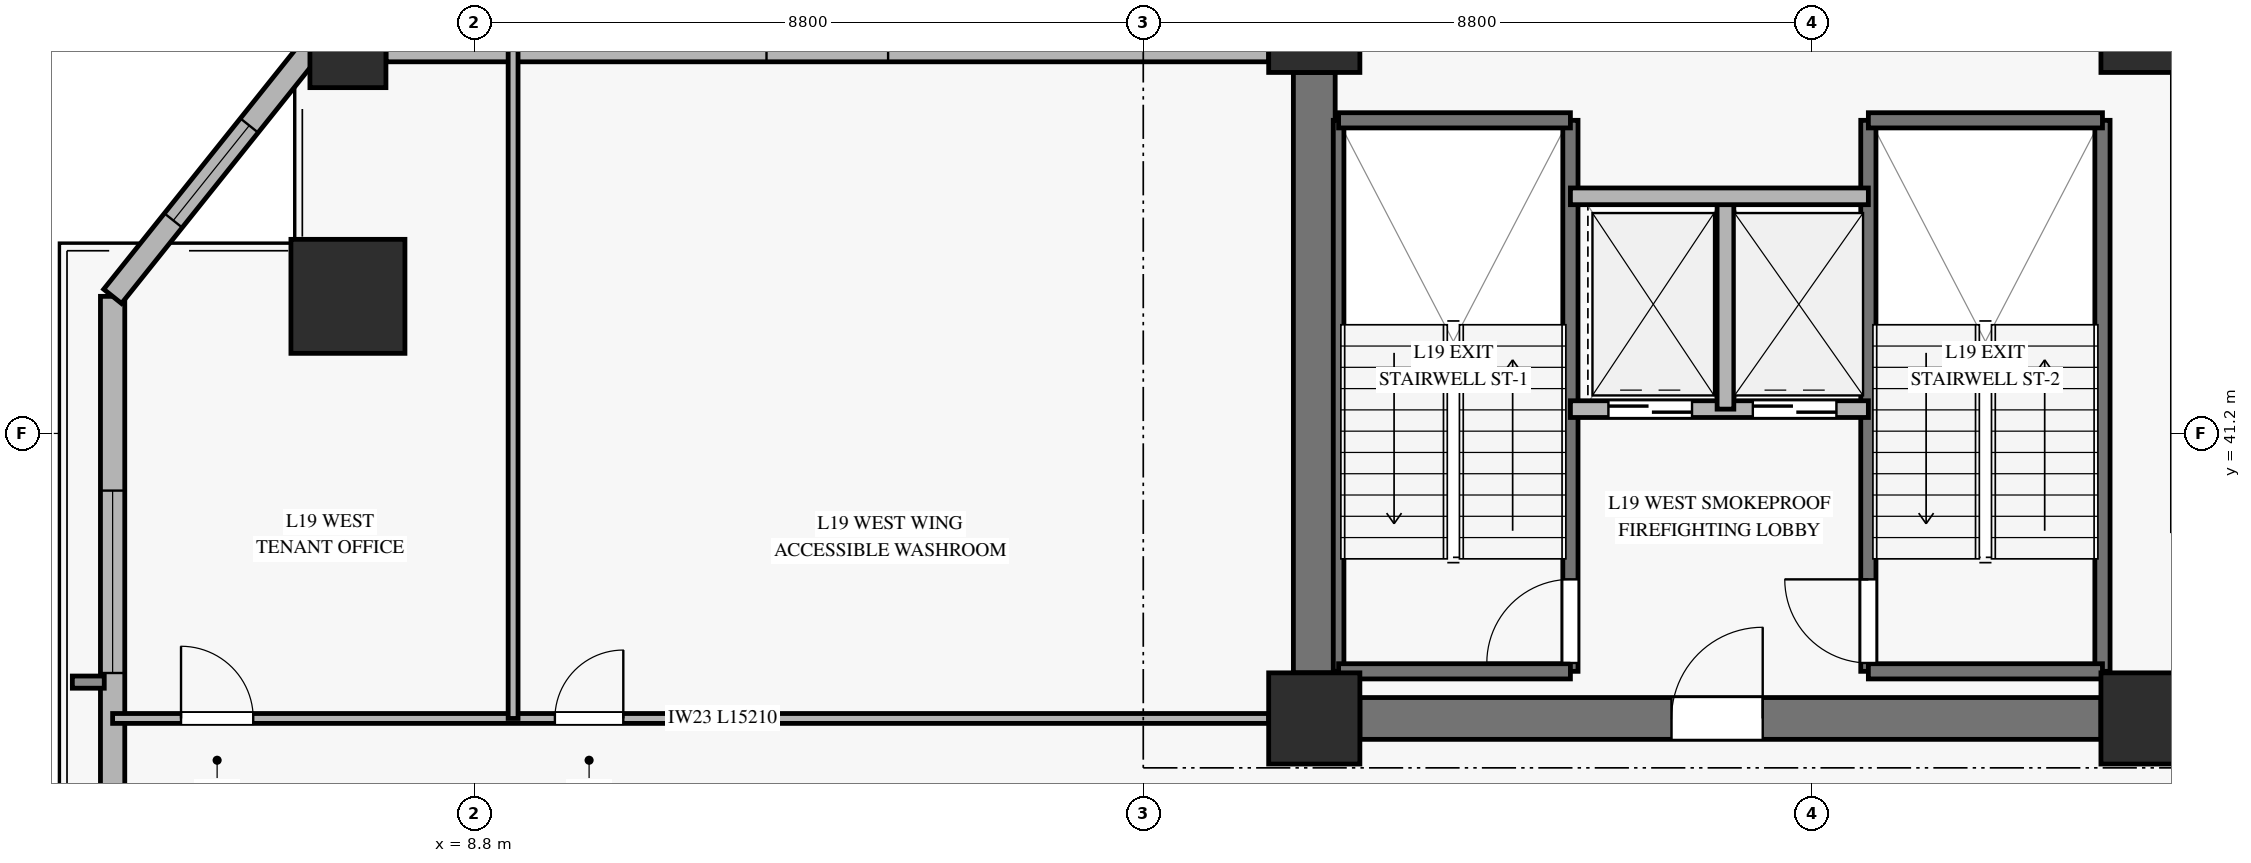
"""IFC4 building model, lengths in metres.
Left out: names, types, materials, properties, quantities, classifications, styles, units other than length and angle.
Written with IfcOpenShell. Run it as: python <this file> out.ifc"""

import sys

from ifc_helpers import new_model, si_unit, direction, frame, frame_2d, origin, origin_2d, place, context, subcontext, project, spatial, rectangle, hollow_rectangle, extrude, source, transform, mapped, element, fill, save


model = new_model("IFC4")
c1 = context("Model", 3, precision=1e-05, world=origin(), true_north=direction((0.0, 1.0)))
c2 = subcontext(c1, "Body", "Model", "MODEL_VIEW")
j1 = project(units=[si_unit("LENGTHUNIT", "METRE"), si_unit("PLANEANGLEUNIT", "RADIAN")], contexts=[c1])
p1 = place(None, origin())
s1 = spatial("IfcSite", under=j1, at=p1, CompositionType="ELEMENT")
p2 = place(p1, origin())
s2 = spatial("IfcBuilding", under=s1, at=p2, CompositionType="ELEMENT")
p3 = place(p2, frame((0.0, 0.0, 79.6)))
s3 = spatial("IfcBuildingStorey", under=s2, at=p3, CompositionType="ELEMENT", Elevation=79.6)
m1 = source(origin(), c2, "Body", "SweptSolid", [
    extrude(rectangle(XDim=1.2, YDim=1.2, at=origin_2d()), origin(), (0.0, 0.0, 1.0), 3.68),
])
for number, where, z_axis, x_axis in (
    (1, (19.85, 37.45, 0.0), (0.0, 0.0, 1.0), (1.0, 0.0, 0.0)),
    (2, (19.85, 46.55, 0.0), (0.0, 0.0, 1.0), (1.0, 0.0, 0.0)),
    (3, (30.8, 37.45, 0.0), (0.0, 0.0, 1.0), (1.0, 0.0, 0.0)),
    (4, (30.8, 46.55, 0.0), (0.0, 0.0, 1.0), (1.0, 0.0, 0.0)),
):
    element("IfcColumn", number, at=place(p3, frame(where, z_axis=z_axis, x_axis=x_axis)), inside=s3, PredefinedType="PILASTER", context=c2, shape_type="MappedRepresentation", body=[
        mapped(m1, transform((0.0, 0.0, 0.0), x_axis=(1.0, 0.0, 0.0), y_axis=(0.0, 1.0, 0.0), z_axis=(0.0, 0.0, 1.0), scale=1.0)),
    ])
p4 = place(p3, frame((20.45, 37.45, 0.0), z_axis=(0.0, 0.0, 1.0), x_axis=(1.0, 0.0, 0.0)))
e5 = element("IfcWall", 5, at=p4, inside=s3, PredefinedType="SHEAR", context=c2, shape_type="SweptSolid", body=[
    extrude(rectangle(XDim=9.75, YDim=0.55, at=frame_2d((4.875, 0.0))), origin(), (0.0, 0.0, 1.0), 3.68),
])
p5 = place(p4, frame((4.1, 0.0, 0.0)))
e6 = element("IfcOpeningElement", 6, at=p5, cuts=e5, PredefinedType="OPENING", context=c2, shape_type="SweptSolid", body=[
    extrude(rectangle(XDim=1.2, YDim=2.15, at=frame_2d((0.6, 1.075))), frame((0.0, 0.285, 0.0), z_axis=(0.0, -1.0, 0.0), x_axis=(1.0, 0.0, 0.0)), (0.0, 0.0, 1.0), 0.57),
])
p6 = place(p3, frame((19.85, 38.05, 0.0), z_axis=(0.0, 0.0, 1.0), x_axis=(0.0, 1.0, 0.0)))
e7 = element("IfcWall", 7, at=p6, inside=s3, PredefinedType="SHEAR", context=c2, shape_type="SweptSolid", body=[
    extrude(rectangle(XDim=7.9, YDim=0.55, at=frame_2d((3.95, 0.0))), origin(), (0.0, 0.0, 1.0), 3.68),
])
m2 = source(origin(), c2, "Body", "SweptSolid", [
    extrude(hollow_rectangle(XDim=1.5, YDim=1.5, WallThickness=0.07, at=origin_2d()), origin(), (0.0, 0.0, 1.0), 3.68),
])
p7 = place(p3, frame((7.136, 43.004, 0.0), z_axis=(0.0, 0.0, 1.0), x_axis=(1.0, 0.0, 0.0)))
e8 = element("IfcColumn", 8, at=p7, inside=s3, PredefinedType="COLUMN", context=c2, shape_type="MappedRepresentation", body=[
    mapped(m2, transform((0.0, 0.0, 0.0), x_axis=(1.0, 0.0, 0.0), y_axis=(0.0, 1.0, 0.0), z_axis=(0.0, 0.0, 1.0), scale=1.0)),
])
m3 = source(origin(), c2, "Body", "SweptSolid", [
    extrude(hollow_rectangle(XDim=1.0, YDim=1.0, WallThickness=0.045, at=origin_2d()), origin(), (0.0, 0.0, 1.0), 3.68),
])
p8 = place(p3, frame((7.136, 46.25, 0.0), z_axis=(0.0, 0.0, 1.0), x_axis=(1.0, 0.0, 0.0)))
e9 = element("IfcColumn", 9, at=p8, inside=s3, PredefinedType="COLUMN", context=c2, shape_type="MappedRepresentation", body=[
    mapped(m3, transform((0.0, 0.0, 0.0), x_axis=(1.0, 0.0, 0.0), y_axis=(0.0, 1.0, 0.0), z_axis=(0.0, 0.0, 1.0), scale=1.0)),
])
p9 = place(p3, frame((4.04, 26.255, 0.0), z_axis=(0.0, 0.0, 1.0), x_axis=(0.0, 1.0, 0.0)))
e10 = element("IfcWall", 10, at=p9, inside=s3, PredefinedType="SOLIDWALL", context=c2, shape_type="SweptSolid", body=[
    extrude(rectangle(XDim=16.749, YDim=0.32, at=frame_2d((8.375, 0.0))), origin(), (0.0, 0.0, 1.0), 3.16),
])
p10 = place(p9, frame((0.75, 0.0, 0.45)))
e11 = element("IfcOpeningElement", 11, at=p10, cuts=e10, PredefinedType="OPENING", context=c2, shape_type="SweptSolid", body=[
    extrude(rectangle(XDim=2.4, YDim=2.1, at=frame_2d((1.2, 1.05))), frame((0.0, 0.17, 0.0), z_axis=(0.0, -1.0, 0.0), x_axis=(1.0, 0.0, 0.0)), (0.0, 0.0, 1.0), 0.34),
])
p11 = place(p9, frame((11.793, 0.0, 0.45)))
e12 = element("IfcOpeningElement", 12, at=p11, cuts=e10, PredefinedType="OPENING", context=c2, shape_type="SweptSolid", body=[
    extrude(rectangle(XDim=2.4, YDim=2.1, at=frame_2d((1.2, 1.05))), frame((0.0, 0.17, 0.0), z_axis=(0.0, -1.0, 0.0), x_axis=(1.0, 0.0, 0.0)), (0.0, 0.0, 1.0), 0.34),
])
p12 = place(p3, frame((7.636, 46.25, 0.0), z_axis=(0.0, 0.0, 1.0), x_axis=(1.0, 0.0, 0.0)))
e13 = element("IfcWall", 13, at=p12, inside=s3, PredefinedType="SOLIDWALL", context=c2, shape_type="SweptSolid", body=[
    extrude(rectangle(XDim=11.614, YDim=0.32, at=frame_2d((5.807, 0.0))), origin(), (0.0, 0.0, 1.0), 3.16),
])
p13 = place(p12, frame((5.007, 0.0, 0.45)))
e14 = element("IfcOpeningElement", 14, at=p13, cuts=e13, PredefinedType="OPENING", context=c2, shape_type="SweptSolid", body=[
    extrude(rectangle(XDim=1.6, YDim=2.0, at=frame_2d((0.8, 1.0))), frame((0.0, 0.17, 0.0), z_axis=(0.0, -1.0, 0.0), x_axis=(1.0, 0.0, 0.0)), (0.0, 0.0, 1.0), 0.34),
])
p14 = place(p3, frame((6.636, 46.25, 0.0), z_axis=(0.0, 0.0, 1.0), x_axis=(-0.624558938305, -0.780977677391, 0.0)))
e15 = element("IfcWall", 15, at=p14, inside=s3, PredefinedType="SOLIDWALL", context=c2, shape_type="SweptSolid", body=[
    extrude(rectangle(XDim=4.156, YDim=0.3, at=frame_2d((2.078, 0.0))), origin(), (0.0, 0.0, 1.0), 3.16),
])
p15 = place(p14, frame((1.278, 0.0, 0.45)))
e16 = element("IfcOpeningElement", 16, at=p15, cuts=e15, PredefinedType="OPENING", context=c2, shape_type="SweptSolid", body=[
    extrude(rectangle(XDim=1.6, YDim=2.0, at=frame_2d((0.8, 1.0))), frame((0.0, 0.16, 0.0), z_axis=(0.0, -1.0, 0.0), x_axis=(1.0, 0.0, 0.0)), (0.0, 0.0, 1.0), 0.32),
])
p16 = place(p3, frame((20.17, 38.07, 0.0), z_axis=(0.0, 0.0, 1.0), x_axis=(0.0, 1.0, 0.0)))
e17 = element("IfcWall", 17, at=p16, inside=s3, PredefinedType="SOLIDWALL", context=c2, shape_type="SweptSolid", body=[
    extrude(rectangle(XDim=7.25, YDim=0.14, at=frame_2d((3.625, 0.0))), origin(), (0.0, 0.0, 1.0), 3.9),
])
p17 = place(p3, frame((23.22, 38.07, 0.0), z_axis=(0.0, 0.0, 1.0), x_axis=(0.0, 1.0, 0.0)))
e18 = element("IfcWall", 18, at=p17, inside=s3, PredefinedType="SOLIDWALL", context=c2, shape_type="SweptSolid", body=[
    extrude(rectangle(XDim=7.25, YDim=0.2, at=frame_2d((3.625, 0.0))), origin(), (0.0, 0.0, 1.0), 3.9),
])
p18 = place(p17, frame((0.11, 0.0, 0.0)))
e19 = element("IfcOpeningElement", 19, at=p18, cuts=e18, PredefinedType="OPENING", context=c2, shape_type="SweptSolid", body=[
    extrude(rectangle(XDim=1.1, YDim=2.15, at=frame_2d((0.55, 1.075))), frame((0.0, 0.11, 0.0), z_axis=(0.0, -1.0, 0.0), x_axis=(1.0, 0.0, 0.0)), (0.0, 0.0, 1.0), 0.22),
])
for number, where, z_axis, x_axis in (
    (20, (20.17, 45.32, 0.0), (0.0, 0.0, 1.0), (1.0, 0.0, 0.0)),
    (21, (20.17, 38.07, 0.0), (0.0, 0.0, 1.0), (1.0, 0.0, 0.0)),
):
    element("IfcWall", number, at=place(p3, frame(where, z_axis=z_axis, x_axis=x_axis)), inside=s3, PredefinedType="SOLIDWALL", context=c2, shape_type="SweptSolid", body=[
        extrude(rectangle(XDim=3.05, YDim=0.2, at=frame_2d((1.525, 0.0))), origin(), (0.0, 0.0, 1.0), 3.9),
    ])
p19 = place(p3, frame((27.14, 38.07, 0.0), z_axis=(0.0, 0.0, 1.0), x_axis=(0.0, 1.0, 0.0)))
e22 = element("IfcWall", 22, at=p19, inside=s3, PredefinedType="SOLIDWALL", context=c2, shape_type="SweptSolid", body=[
    extrude(rectangle(XDim=7.25, YDim=0.2, at=frame_2d((3.625, 0.0))), origin(), (0.0, 0.0, 1.0), 3.9),
])
p20 = place(p19, frame((0.11, 0.0, 0.0)))
e23 = element("IfcOpeningElement", 23, at=p20, cuts=e22, PredefinedType="OPENING", context=c2, shape_type="SweptSolid", body=[
    extrude(rectangle(XDim=1.1, YDim=2.15, at=frame_2d((0.55, 1.075))), frame((0.0, 0.11, 0.0), z_axis=(0.0, -1.0, 0.0), x_axis=(1.0, 0.0, 0.0)), (0.0, 0.0, 1.0), 0.22),
])
p21 = place(p3, frame((30.22, 38.07, 0.0), z_axis=(0.0, 0.0, 1.0), x_axis=(0.0, 1.0, 0.0)))
e24 = element("IfcWall", 24, at=p21, inside=s3, PredefinedType="SOLIDWALL", context=c2, shape_type="SweptSolid", body=[
    extrude(rectangle(XDim=7.25, YDim=0.2, at=frame_2d((3.625, 0.0))), origin(), (0.0, 0.0, 1.0), 3.9),
])
for number, where, z_axis, x_axis in (
    (25, (27.14, 45.32, 0.0), (0.0, 0.0, 1.0), (1.0, 0.0, 0.0)),
    (26, (27.14, 38.07, 0.0), (0.0, 0.0, 1.0), (1.0, 0.0, 0.0)),
):
    element("IfcWall", number, at=place(p3, frame(where, z_axis=z_axis, x_axis=x_axis)), inside=s3, PredefinedType="SOLIDWALL", context=c2, shape_type="SweptSolid", body=[
        extrude(rectangle(XDim=3.08, YDim=0.2, at=frame_2d((1.54, 0.0))), origin(), (0.0, 0.0, 1.0), 3.9),
    ])
p22 = place(p3, frame((23.22, 41.52, 0.0), z_axis=(0.0, 0.0, 1.0), x_axis=(1.0, 0.0, 0.0)))
e27 = element("IfcWall", 27, at=p22, inside=s3, PredefinedType="SOLIDWALL", context=c2, shape_type="SweptSolid", body=[
    extrude(rectangle(XDim=3.92, YDim=0.22, at=frame_2d((1.96, 0.0))), origin(), (0.0, 0.0, 1.0), 3.68),
])
p23 = place(p22, frame((0.5, 0.0, 0.0)))
e28 = element("IfcOpeningElement", 28, at=p23, cuts=e27, PredefinedType="OPENING", context=c2, shape_type="SweptSolid", body=[
    extrude(rectangle(XDim=1.1, YDim=2.2, at=frame_2d((0.55, 1.1))), frame((0.0, 0.12, 0.0), z_axis=(0.0, -1.0, 0.0), x_axis=(1.0, 0.0, 0.0)), (0.0, 0.0, 1.0), 0.24),
])
p24 = place(p22, frame((2.4, 0.0, 0.0)))
e29 = element("IfcOpeningElement", 29, at=p24, cuts=e27, PredefinedType="OPENING", context=c2, shape_type="SweptSolid", body=[
    extrude(rectangle(XDim=1.1, YDim=2.2, at=frame_2d((0.55, 1.1))), frame((0.0, 0.12, 0.0), z_axis=(0.0, -1.0, 0.0), x_axis=(1.0, 0.0, 0.0)), (0.0, 0.0, 1.0), 0.24),
])
p25 = place(p3, frame((25.26, 41.52, 0.0), z_axis=(0.0, 0.0, 1.0), x_axis=(0.0, 1.0, 0.0)))
e30 = element("IfcWall", 30, at=p25, inside=s3, PredefinedType="SOLIDWALL", context=c2, shape_type="SweptSolid", body=[
    extrude(rectangle(XDim=2.8, YDim=0.22, at=frame_2d((1.4, 0.0))), origin(), (0.0, 0.0, 1.0), 3.68),
])
p26 = place(p3, frame((23.22, 44.32, 0.0), z_axis=(0.0, 0.0, 1.0), x_axis=(1.0, 0.0, 0.0)))
e31 = element("IfcWall", 31, at=p26, inside=s3, PredefinedType="SOLIDWALL", context=c2, shape_type="SweptSolid", body=[
    extrude(rectangle(XDim=3.92, YDim=0.22, at=frame_2d((1.96, 0.0))), origin(), (0.0, 0.0, 1.0), 3.68),
])
p27 = place(p3, frame((4.04, 37.45, 0.0), z_axis=(0.0, 0.0, 1.0), x_axis=(1.0, 0.0, 0.0)))
e32 = element("IfcWall", 32, at=p27, inside=s3, PredefinedType="PARTITIONING", context=c2, shape_type="SweptSolid", body=[
    extrude(rectangle(XDim=15.21, YDim=0.13, at=frame_2d((7.605, 0.0))), origin(), (0.0, 0.0, 1.0), 3.165),
])
p28 = place(p27, frame((0.9, 0.0, 0.0)))
e33 = element("IfcOpeningElement", 33, at=p28, cuts=e32, PredefinedType="OPENING", context=c2, shape_type="SweptSolid", body=[
    extrude(rectangle(XDim=0.95, YDim=2.1, at=frame_2d((0.475, 1.05))), frame((0.0, 0.075, 0.0), z_axis=(0.0, -1.0, 0.0), x_axis=(1.0, 0.0, 0.0)), (0.0, 0.0, 1.0), 0.15),
])
p29 = place(p27, frame((5.819, 0.0, 0.0)))
e34 = element("IfcOpeningElement", 34, at=p29, cuts=e32, PredefinedType="OPENING", context=c2, shape_type="SweptSolid", body=[
    extrude(rectangle(XDim=0.9, YDim=2.1, at=frame_2d((0.45, 1.05))), frame((0.0, 0.075, 0.0), z_axis=(0.0, -1.0, 0.0), x_axis=(1.0, 0.0, 0.0)), (0.0, 0.0, 1.0), 0.15),
])
p30 = place(p3, frame((9.309, 37.45, 0.0), z_axis=(0.0, 0.0, 1.0), x_axis=(0.0, 1.0, 0.0)))
e35 = element("IfcWall", 35, at=p30, inside=s3, PredefinedType="PARTITIONING", context=c2, shape_type="SweptSolid", body=[
    extrude(rectangle(XDim=8.8, YDim=0.13, at=frame_2d((4.4, 0.0))), origin(), (0.0, 0.0, 1.0), 3.68),
])
m4 = source(origin(), c2, "Body", "SweptSolid", [
    extrude(rectangle(XDim=2.4, YDim=2.1, at=frame_2d((1.2, 1.05))), frame((0.0, 0.03, 0.0), z_axis=(0.0, -1.0, 0.0), x_axis=(1.0, 0.0, 0.0)), (0.0, 0.0, 1.0), 0.06),
])
p31 = place(p11, origin())
e36 = element("IfcWindow", 36, at=p31, inside=s3, PartitioningType="SINGLE_PANEL", PredefinedType="WINDOW", context=c2, shape_type="MappedRepresentation", body=[
    mapped(m4, transform((0.0, 0.0, 0.0), x_axis=(1.0, 0.0, 0.0), y_axis=(0.0, 1.0, 0.0), z_axis=(0.0, 0.0, 1.0), scale=1.0)),
])
fill(e12, e36)
m5 = source(origin(), c2, "Body", "SweptSolid", [
    extrude(rectangle(XDim=1.6, YDim=2.0, at=frame_2d((0.8, 1.0))), frame((0.0, 0.03, 0.0), z_axis=(0.0, -1.0, 0.0), x_axis=(1.0, 0.0, 0.0)), (0.0, 0.0, 1.0), 0.06),
])
p32 = place(p15, origin())
e37 = element("IfcWindow", 37, at=p32, inside=s3, PartitioningType="SINGLE_PANEL", PredefinedType="WINDOW", context=c2, shape_type="MappedRepresentation", body=[
    mapped(m5, transform((0.0, 0.0, 0.0), x_axis=(1.0, 0.0, 0.0), y_axis=(0.0, 1.0, 0.0), z_axis=(0.0, 0.0, 1.0), scale=1.0)),
])
fill(e16, e37)
m6 = source(origin(), c2, "Body", "SweptSolid", [
    extrude(rectangle(XDim=1.1, YDim=2.15, at=frame_2d((0.55, 1.075))), frame((0.0, 0.025, 0.0), z_axis=(0.0, -1.0, 0.0), x_axis=(1.0, 0.0, 0.0)), (0.0, 0.0, 1.0), 0.05),
])
p33 = place(p18, origin())
e38 = element("IfcDoor", 38, at=p33, inside=s3, OperationType="SINGLE_SWING_LEFT", PredefinedType="DOOR", context=c2, shape_type="MappedRepresentation", body=[
    mapped(m6, transform((0.0, 0.0, 0.0), x_axis=(1.0, 0.0, 0.0), y_axis=(0.0, 1.0, 0.0), z_axis=(0.0, 0.0, 1.0), scale=1.0)),
])
fill(e19, e38)
p34 = place(p20, origin())
e39 = element("IfcDoor", 39, at=p34, inside=s3, OperationType="SINGLE_SWING_RIGHT", PredefinedType="DOOR", context=c2, shape_type="MappedRepresentation", body=[
    mapped(m6, transform((0.0, 0.0, 0.0), x_axis=(1.0, 0.0, 0.0), y_axis=(0.0, 1.0, 0.0), z_axis=(0.0, 0.0, 1.0), scale=1.0)),
])
fill(e23, e39)
m7 = source(origin(), c2, "Body", "SweptSolid", [
    extrude(rectangle(XDim=1.1, YDim=2.2, at=frame_2d((0.55, 1.1))), frame((0.0, 0.025, 0.0), z_axis=(0.0, -1.0, 0.0), x_axis=(1.0, 0.0, 0.0)), (0.0, 0.0, 1.0), 0.05),
])
p35 = place(p23, origin())
e40 = element("IfcDoor", 40, at=p35, inside=s3, OperationType="SLIDING_TO_LEFT", PredefinedType="DOOR", context=c2, shape_type="MappedRepresentation", body=[
    mapped(m7, transform((0.0, 0.0, 0.0), x_axis=(1.0, 0.0, 0.0), y_axis=(0.0, 1.0, 0.0), z_axis=(0.0, 0.0, 1.0), scale=1.0)),
])
fill(e28, e40)
p36 = place(p24, origin())
e41 = element("IfcDoor", 41, at=p36, inside=s3, OperationType="SLIDING_TO_LEFT", PredefinedType="DOOR", context=c2, shape_type="MappedRepresentation", body=[
    mapped(m7, transform((0.0, 0.0, 0.0), x_axis=(1.0, 0.0, 0.0), y_axis=(0.0, 1.0, 0.0), z_axis=(0.0, 0.0, 1.0), scale=1.0)),
])
fill(e29, e41)
m8 = source(origin(), c2, "Body", "SweptSolid", [
    extrude(rectangle(XDim=1.2, YDim=2.15, at=frame_2d((0.6, 1.075))), frame((0.0, 0.025, 0.0), z_axis=(0.0, -1.0, 0.0), x_axis=(1.0, 0.0, 0.0)), (0.0, 0.0, 1.0), 0.05),
])
p37 = place(p5, origin())
e42 = element("IfcDoor", 42, at=p37, inside=s3, OperationType="SINGLE_SWING_RIGHT", PredefinedType="DOOR", context=c2, shape_type="MappedRepresentation", body=[
    mapped(m8, transform((0.0, 0.0, 0.0), x_axis=(1.0, 0.0, 0.0), y_axis=(0.0, 1.0, 0.0), z_axis=(0.0, 0.0, 1.0), scale=1.0)),
])
fill(e6, e42)
m9 = source(origin(), c2, "Body", "SweptSolid", [
    extrude(rectangle(XDim=0.95, YDim=2.1, at=frame_2d((0.475, 1.05))), frame((0.0, 0.025, 0.0), z_axis=(0.0, -1.0, 0.0), x_axis=(1.0, 0.0, 0.0)), (0.0, 0.0, 1.0), 0.05),
])
p38 = place(p28, origin())
e43 = element("IfcDoor", 43, at=p38, inside=s3, OperationType="SINGLE_SWING_LEFT", PredefinedType="DOOR", context=c2, shape_type="MappedRepresentation", body=[
    mapped(m9, transform((0.0, 0.0, 0.0), x_axis=(1.0, 0.0, 0.0), y_axis=(0.0, 1.0, 0.0), z_axis=(0.0, 0.0, 1.0), scale=1.0)),
])
fill(e33, e43)
m10 = source(origin(), c2, "Body", "SweptSolid", [
    extrude(rectangle(XDim=0.9, YDim=2.1, at=frame_2d((0.45, 1.05))), frame((0.0, 0.025, 0.0), z_axis=(0.0, -1.0, 0.0), x_axis=(1.0, 0.0, 0.0)), (0.0, 0.0, 1.0), 0.05),
])
p39 = place(p29, origin())
e44 = element("IfcDoor", 44, at=p39, inside=s3, OperationType="SINGLE_SWING_RIGHT", PredefinedType="DOOR", context=c2, shape_type="MappedRepresentation", body=[
    mapped(m10, transform((0.0, 0.0, 0.0), x_axis=(1.0, 0.0, 0.0), y_axis=(0.0, 1.0, 0.0), z_axis=(0.0, 0.0, 1.0), scale=1.0)),
])
fill(e34, e44)
save(model, sys.argv[1])
